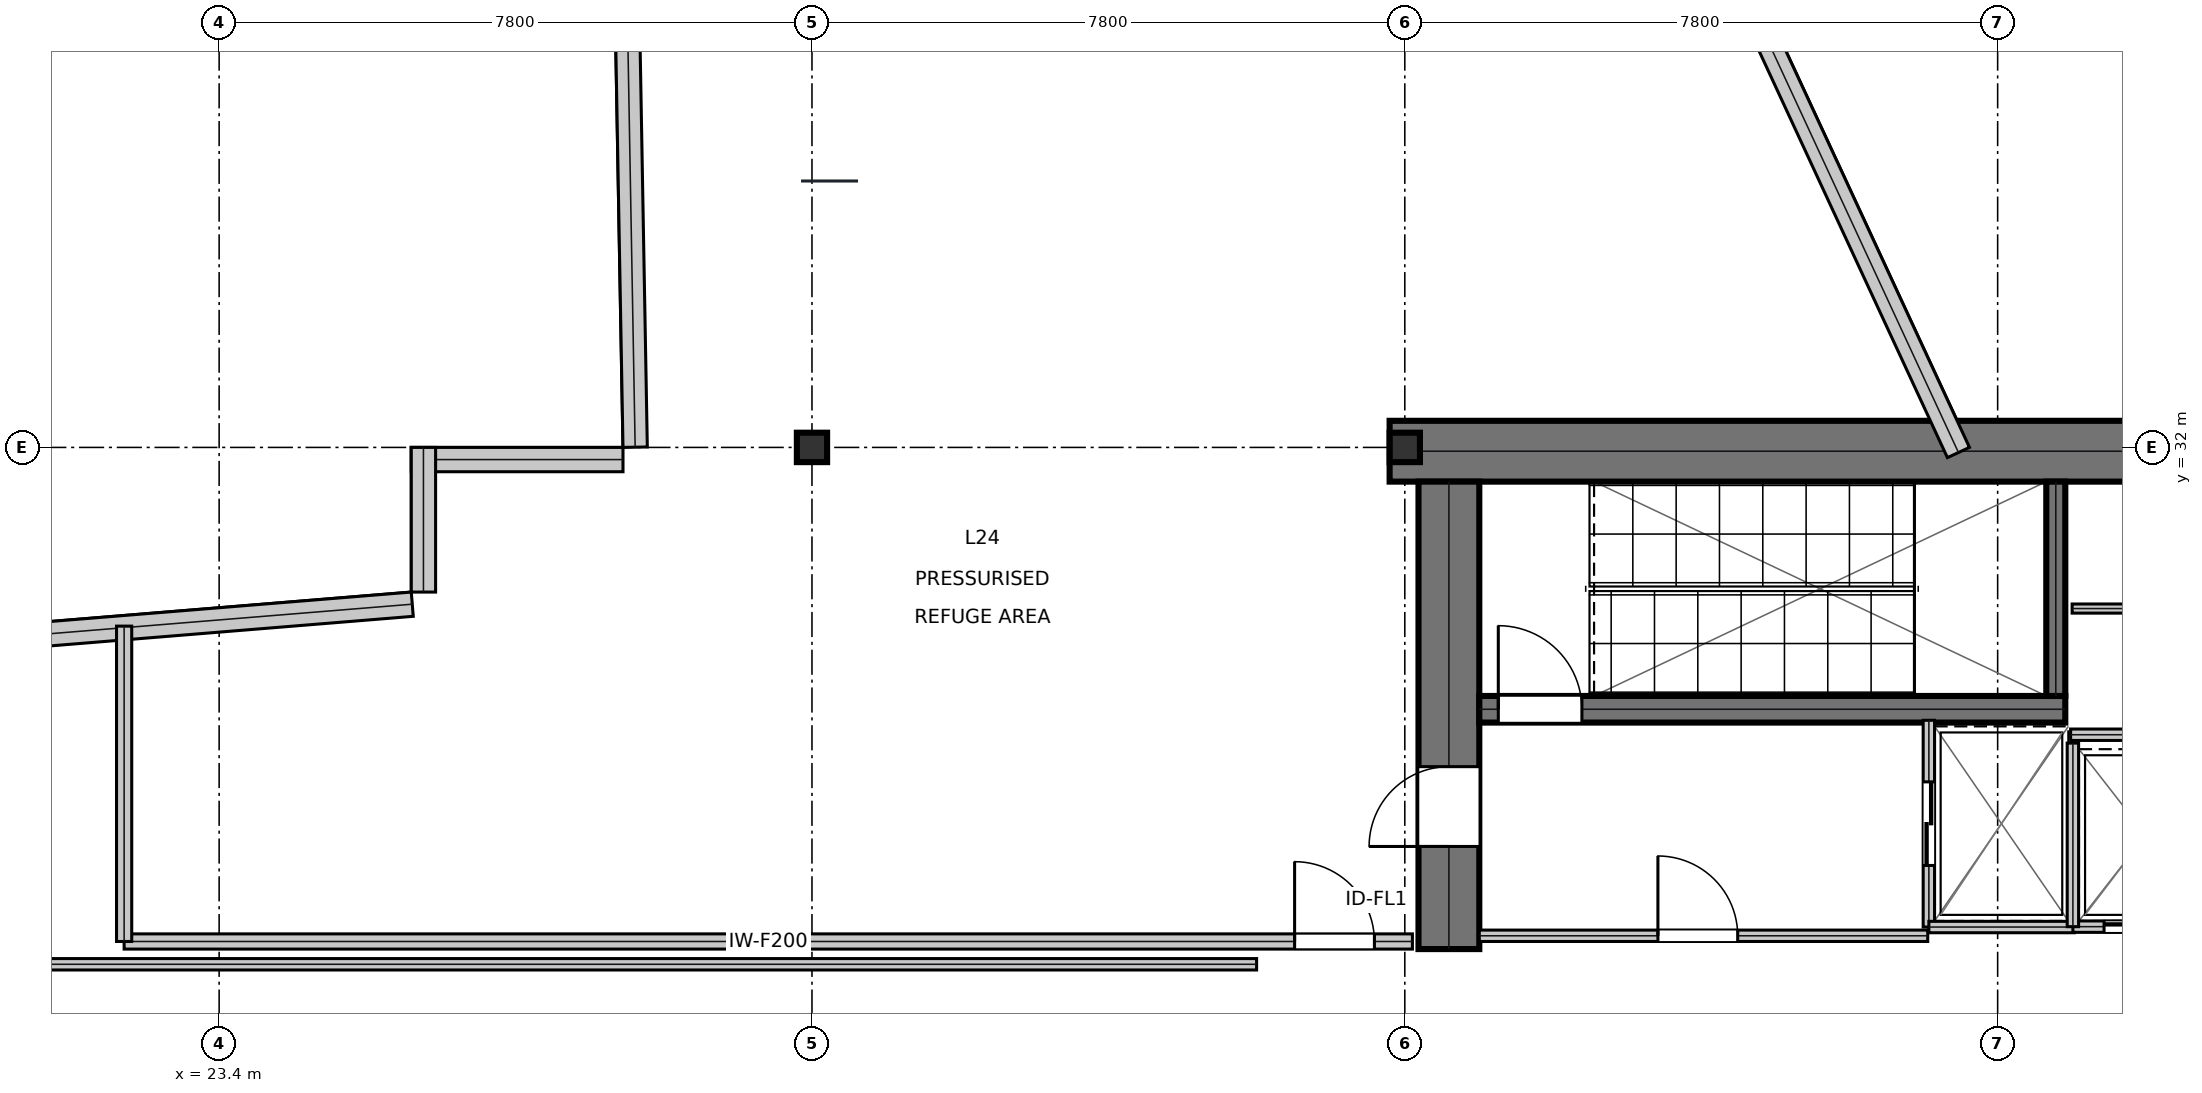
"""IFC4 building model, lengths in metres.
Left out: names, types, materials, properties, quantities, classifications, styles, units other than length and angle.
Written with IfcOpenShell. Run it as: python <this file> out.ifc"""

import sys

from ifc_helpers import new_model, si_unit, direction, frame, frame_2d, origin, origin_2d, place, context, subcontext, project, spatial, rectangle, i_section, extrude, element, fill, save


model = new_model("IFC4")
c1 = context("Model", 3, precision=1e-05, world=origin(), true_north=direction((0.0, 1.0)))
c2 = subcontext(c1, "Body", "Model", "MODEL_VIEW")
j1 = project(units=[si_unit("LENGTHUNIT", "METRE"), si_unit("PLANEANGLEUNIT", "RADIAN")], contexts=[c1])
p1 = place(None, origin())
s1 = spatial("IfcSite", under=j1, at=p1, CompositionType="ELEMENT")
p2 = place(p1, origin())
s2 = spatial("IfcBuilding", under=s1, at=p2, CompositionType="ELEMENT")
p3 = place(p2, frame((0.0, 0.0, 106.65)))
s3 = spatial("IfcBuildingStorey", under=s2, at=p3, CompositionType="ELEMENT", Elevation=106.65)
p4 = place(p3, frame((38.8, 31.95, 0.0), z_axis=(0.0, 0.0, 1.0), x_axis=(1.0, 0.0, 0.0)))
e1 = element("IfcWall", 1, at=p4, inside=s3, PredefinedType="SHEAR", context=c2, shape_type="SweptSolid", body=[
    extrude(rectangle(XDim=16.0, YDim=0.8, at=frame_2d((8.0, 0.0))), origin(), (0.0, 0.0, 1.0), 5.12),
])
p5 = place(p3, frame((39.58, 25.4, 0.0), z_axis=(0.0, 0.0, 1.0), x_axis=(0.0, 1.0, 0.0)))
e2 = element("IfcWall", 2, at=p5, inside=s3, PredefinedType="SHEAR", context=c2, shape_type="SweptSolid", body=[
    extrude(rectangle(XDim=6.15, YDim=0.8, at=frame_2d((3.075, 0.0))), origin(), (0.0, 0.0, 1.0), 5.12),
])
p6 = place(p5, frame((1.35, 0.0, 0.0)))
e3 = element("IfcOpeningElement", 3, at=p6, cuts=e2, PredefinedType="OPENING", context=c2, shape_type="SweptSolid", body=[
    extrude(rectangle(XDim=1.05, YDim=2.15, at=frame_2d((0.525, 1.075))), frame((0.0, 0.41, 0.0), z_axis=(0.0, -1.0, 0.0), x_axis=(1.0, 0.0, 0.0)), (0.0, 0.0, 1.0), 0.82),
])
p7 = place(p3, frame((39.98, 28.555, 0.0), z_axis=(0.0, 0.0, 1.0), x_axis=(1.0, 0.0, 0.0)))
e4 = element("IfcWall", 4, at=p7, inside=s3, PredefinedType="SHEAR", context=c2, shape_type="SweptSolid", body=[
    extrude(rectangle(XDim=7.71, YDim=0.35, at=frame_2d((3.855, 0.0))), origin(), (0.0, 0.0, 1.0), 5.12),
])
p8 = place(p7, frame((0.25, 0.0, 0.0)))
e5 = element("IfcOpeningElement", 5, at=p8, cuts=e4, PredefinedType="OPENING", context=c2, shape_type="SweptSolid", body=[
    extrude(rectangle(XDim=1.1, YDim=2.15, at=frame_2d((0.55, 1.075))), frame((0.0, 0.185, 0.0), z_axis=(0.0, -1.0, 0.0), x_axis=(1.0, 0.0, 0.0)), (0.0, 0.0, 1.0), 0.37),
])
p9 = place(p3, frame((47.565, 28.73, 0.0), z_axis=(0.0, 0.0, 1.0), x_axis=(0.0, 1.0, 0.0)))
e6 = element("IfcWall", 6, at=p9, inside=s3, PredefinedType="SHEAR", context=c2, shape_type="SweptSolid", body=[
    extrude(rectangle(XDim=2.82, YDim=0.25, at=frame_2d((1.41, 0.0))), origin(), (0.0, 0.0, 1.0), 5.12),
])
for number, where, z_axis, x_axis in (
    (7, (31.2, 32.0, 0.0), (0.0, 0.0, 1.0), (1.0, 0.0, 0.0)),
    (8, (39.0, 32.0, 0.0), (0.0, 0.0, 1.0), (1.0, 0.0, 0.0)),
):
    element("IfcColumn", number, at=place(p3, frame(where, z_axis=z_axis, x_axis=x_axis)), inside=s3, PredefinedType="COLUMN", context=c2, shape_type="SweptSolid", body=[
        extrude(i_section(OverallWidth=0.398, OverallDepth=0.387, WebThickness=0.021, FlangeThickness=0.033, at=origin_2d()), origin(), (0.0, 0.0, 1.0), 5.394),
    ])
p10 = place(p3, frame((46.284, 31.933, 0.0), z_axis=(0.0, 0.0, 1.0), x_axis=(-0.420271770487, 0.907398280212, 0.0)))
e9 = element("IfcWall", 9, at=p10, inside=s3, PredefinedType="STANDARD", context=c2, shape_type="SweptSolid", body=[
    extrude(rectangle(XDim=11.631, YDim=0.32, at=frame_2d((5.815, 0.0))), origin(), (0.0, 0.0, 1.0), 4.648),
])
p11 = place(p3, frame((28.681, 42.724, 0.0), z_axis=(0.0, 0.0, 1.0), x_axis=(0.017987206329, -0.999838217117, 0.0)))
e10 = element("IfcWall", 10, at=p11, inside=s3, PredefinedType="STANDARD", context=c2, shape_type="SweptSolid", body=[
    extrude(rectangle(XDim=10.723, YDim=0.32, at=frame_2d((5.361, 0.0))), origin(), (0.0, 0.0, 1.0), 5.12),
])
p12 = place(p3, frame((28.714, 31.84, 0.0), z_axis=(0.0, 0.0, 1.0), x_axis=(-1.0, 0.0, 0.0)))
e11 = element("IfcWall", 11, at=p12, inside=s3, PredefinedType="STANDARD", context=c2, shape_type="SweptSolid", body=[
    extrude(rectangle(XDim=2.786, YDim=0.32, at=frame_2d((1.393, 0.0))), origin(), (0.0, 0.0, 1.0), 5.12),
])
p13 = place(p3, frame((26.088, 32.0, 0.0), z_axis=(0.0, 0.0, 1.0), x_axis=(0.0, -1.0, 0.0)))
e12 = element("IfcWall", 12, at=p13, inside=s3, PredefinedType="STANDARD", context=c2, shape_type="SweptSolid", body=[
    extrude(rectangle(XDim=1.903, YDim=0.32, at=frame_2d((0.952, 0.0))), origin(), (0.0, 0.0, 1.0), 4.648),
])
p14 = place(p3, frame((25.941, 29.938, 0.0), z_axis=(0.0, 0.0, 1.0), x_axis=(-0.996692994059, -0.081259310815, 0.0)))
e13 = element("IfcWall", 13, at=p14, inside=s3, PredefinedType="STANDARD", context=c2, shape_type="SweptSolid", body=[
    extrude(rectangle(XDim=16.482, YDim=0.32, at=frame_2d((8.241, 0.0))), origin(), (0.0, 0.0, 1.0), 4.648),
])
p15 = place(p3, frame((39.98, 25.575, 0.0), z_axis=(0.0, 0.0, 1.0), x_axis=(1.0, 0.0, 0.0)))
e14 = element("IfcWall", 14, at=p15, inside=s3, PredefinedType="PARTITIONING", context=c2, shape_type="SweptSolid", body=[
    extrude(rectangle(XDim=5.9, YDim=0.15, at=frame_2d((2.95, 0.0))), origin(), (0.0, 0.0, 1.0), 5.12),
])
p16 = place(p15, frame((2.35, 0.0, 0.0)))
e15 = element("IfcOpeningElement", 15, at=p16, cuts=e14, PredefinedType="OPENING", context=c2, shape_type="SweptSolid", body=[
    extrude(rectangle(XDim=1.05, YDim=2.15, at=frame_2d((0.525, 1.075))), frame((0.0, 0.085, 0.0), z_axis=(0.0, -1.0, 0.0), x_axis=(1.0, 0.0, 0.0)), (0.0, 0.0, 1.0), 0.17),
])
p17 = place(p3, frame((45.895, 25.69, 0.0), z_axis=(0.0, 0.0, 1.0), x_axis=(0.0, 1.0, 0.0)))
e16 = element("IfcWall", 16, at=p17, inside=s3, PredefinedType="PARTITIONING", context=c2, shape_type="SweptSolid", body=[
    extrude(rectangle(XDim=2.72, YDim=0.15, at=frame_2d((1.36, 0.0))), origin(), (0.0, 0.0, 1.0), 5.12),
])
p18 = place(p17, frame((0.81, 0.0, 0.0)))
e17 = element("IfcOpeningElement", 17, at=p18, cuts=e16, PredefinedType="OPENING", context=c2, shape_type="SweptSolid", body=[
    extrude(rectangle(XDim=1.1, YDim=2.15, at=frame_2d((0.55, 1.075))), frame((0.0, 0.085, 0.0), z_axis=(0.0, -1.0, 0.0), x_axis=(1.0, 0.0, 0.0)), (0.0, 0.0, 1.0), 0.17),
])
p19 = place(p3, frame((45.895, 25.69, 0.0), z_axis=(0.0, 0.0, 1.0), x_axis=(1.0, 0.0, 0.0)))
e18 = element("IfcWall", 18, at=p19, inside=s3, PredefinedType="PARTITIONING", context=c2, shape_type="SweptSolid", body=[
    extrude(rectangle(XDim=1.915, YDim=0.15, at=frame_2d((0.958, 0.0))), origin(), (0.0, 0.0, 1.0), 5.12),
])
p20 = place(p3, frame((47.79, 25.695, 0.0), z_axis=(0.0, 0.0, 1.0), x_axis=(1.0, 0.0, 0.0)))
e19 = element("IfcWall", 19, at=p20, inside=s3, PredefinedType="PARTITIONING", context=c2, shape_type="SweptSolid", body=[
    extrude(rectangle(XDim=1.92, YDim=0.15, at=frame_2d((0.96, 0.0))), origin(), (0.0, 0.0, 1.0), 5.12),
])
p21 = place(p20, frame((0.41, 0.0, 0.0)))
e20 = element("IfcOpeningElement", 20, at=p21, cuts=e19, PredefinedType="OPENING", context=c2, shape_type="SweptSolid", body=[
    extrude(rectangle(XDim=1.1, YDim=2.15, at=frame_2d((0.55, 1.075))), frame((0.0, 0.085, 0.0), z_axis=(0.0, -1.0, 0.0), x_axis=(1.0, 0.0, 0.0)), (0.0, 0.0, 1.0), 0.17),
])
p22 = place(p3, frame((47.79, 25.695, 0.0), z_axis=(0.0, 0.0, 1.0), x_axis=(0.0, 1.0, 0.0)))
e21 = element("IfcWall", 21, at=p22, inside=s3, PredefinedType="PARTITIONING", context=c2, shape_type="SweptSolid", body=[
    extrude(rectangle(XDim=2.415, YDim=0.15, at=frame_2d((1.208, 0.0))), origin(), (0.0, 0.0, 1.0), 5.12),
])
p23 = place(p3, frame((47.76, 28.22, 0.0), z_axis=(0.0, 0.0, 1.0), x_axis=(1.0, 0.0, 0.0)))
e22 = element("IfcWall", 22, at=p23, inside=s3, PredefinedType="PARTITIONING", context=c2, shape_type="SweptSolid", body=[
    extrude(rectangle(XDim=1.96, YDim=0.15, at=frame_2d((0.98, 0.0))), origin(), (0.0, 0.0, 1.0), 5.12),
])
p24 = place(p3, frame((47.78, 29.88, 0.0), z_axis=(0.0, 0.0, 1.0), x_axis=(1.0, 0.0, 0.0)))
e23 = element("IfcWall", 23, at=p24, inside=s3, PredefinedType="PARTITIONING", context=c2, shape_type="SweptSolid", body=[
    extrude(rectangle(XDim=1.92, YDim=0.12, at=frame_2d((0.96, 0.0))), origin(), (0.0, 0.0, 1.0), 5.12),
])
p25 = place(p3, frame((22.15, 25.5, 0.0), z_axis=(0.0, 0.0, 1.0), x_axis=(1.0, 0.0, 0.0)))
e24 = element("IfcWall", 24, at=p25, inside=s3, PredefinedType="SOLIDWALL", context=c2, shape_type="SweptSolid", body=[
    extrude(rectangle(XDim=16.95, YDim=0.2, at=frame_2d((8.475, 0.0))), origin(), (0.0, 0.0, 1.0), 4.5),
])
p26 = place(p25, frame((15.4, 0.0, 0.0)))
e25 = element("IfcOpeningElement", 25, at=p26, cuts=e24, PredefinedType="OPENING", context=c2, shape_type="SweptSolid", body=[
    extrude(rectangle(XDim=1.05, YDim=2.15, at=frame_2d((0.525, 1.075))), frame((0.0, 0.11, 0.0), z_axis=(0.0, -1.0, 0.0), x_axis=(1.0, 0.0, 0.0)), (0.0, 0.0, 1.0), 0.22),
])
p27 = place(p3, frame((22.15, 25.5, 0.0), z_axis=(0.0, 0.0, 1.0), x_axis=(0.0, 1.0, 0.0)))
e26 = element("IfcWall", 26, at=p27, inside=s3, PredefinedType="SOLIDWALL", context=c2, shape_type="SweptSolid", body=[
    extrude(rectangle(XDim=4.149, YDim=0.2, at=frame_2d((2.074, 0.0))), origin(), (0.0, 0.0, 1.0), 5.12),
])
p28 = place(p3, frame((16.5, 25.2, 0.0), z_axis=(0.0, 0.0, 1.0), x_axis=(1.0, 0.0, 0.0)))
e27 = element("IfcWall", 27, at=p28, inside=s3, PredefinedType="PARTITIONING", context=c2, shape_type="SweptSolid", body=[
    extrude(rectangle(XDim=20.55, YDim=0.15, at=frame_2d((10.275, 0.0))), origin(), (0.0, 0.0, 1.0), 4.5),
])
p29 = place(p28, frame((3.095, 0.0, 0.0)))
e28 = element("IfcOpeningElement", 28, at=p29, cuts=e27, PredefinedType="OPENING", context=c2, shape_type="SweptSolid", body=[
    extrude(rectangle(XDim=1.4, YDim=2.2, at=frame_2d((0.7, 1.1))), frame((0.0, 0.085, 0.0), z_axis=(0.0, -1.0, 0.0), x_axis=(1.0, 0.0, 0.0)), (0.0, 0.0, 1.0), 0.17),
])
p30 = place(p16, origin())
e29 = element("IfcDoor", 29, at=p30, inside=s3, OperationType="SINGLE_SWING_LEFT", PredefinedType="DOOR", context=c2, shape_type="SweptSolid", body=[
    extrude(rectangle(XDim=1.05, YDim=2.15, at=frame_2d((0.525, 1.075))), frame((0.0, 0.025, 0.0), z_axis=(0.0, -1.0, 0.0), x_axis=(1.0, 0.0, 0.0)), (0.0, 0.0, 1.0), 0.05),
])
fill(e15, e29)
p31 = place(p18, frame((1.1, 0.0, 0.0), z_axis=(0.0, 0.0, 1.0), x_axis=(-1.0, 0.0, 0.0)))
e30 = element("IfcDoor", 30, at=p31, inside=s3, OperationType="DOUBLE_DOOR_SLIDING", PredefinedType="DOOR", context=c2, shape_type="SweptSolid", body=[
    extrude(rectangle(XDim=1.1, YDim=2.15, at=frame_2d((0.55, 1.075))), frame((0.0, 0.025, 0.0), z_axis=(0.0, -1.0, 0.0), x_axis=(1.0, 0.0, 0.0)), (0.0, 0.0, 1.0), 0.05),
])
fill(e17, e30)
p32 = place(p21, frame((1.1, 0.0, 0.0), z_axis=(0.0, 0.0, 1.0), x_axis=(-1.0, 0.0, 0.0)))
e31 = element("IfcDoor", 31, at=p32, inside=s3, OperationType="DOUBLE_DOOR_SLIDING", PredefinedType="DOOR", context=c2, shape_type="SweptSolid", body=[
    extrude(rectangle(XDim=1.1, YDim=2.15, at=frame_2d((0.55, 1.075))), frame((0.0, 0.025, 0.0), z_axis=(0.0, -1.0, 0.0), x_axis=(1.0, 0.0, 0.0)), (0.0, 0.0, 1.0), 0.05),
])
fill(e20, e31)
p33 = place(p26, origin())
e32 = element("IfcDoor", 32, at=p33, inside=s3, OperationType="SINGLE_SWING_LEFT", PredefinedType="DOOR", context=c2, shape_type="SweptSolid", body=[
    extrude(rectangle(XDim=1.05, YDim=2.15, at=frame_2d((0.525, 1.075))), frame((0.0, 0.025, 0.0), z_axis=(0.0, -1.0, 0.0), x_axis=(1.0, 0.0, 0.0)), (0.0, 0.0, 1.0), 0.05),
])
fill(e25, e32)
p34 = place(p8, origin())
e33 = element("IfcDoor", 33, at=p34, inside=s3, OperationType="SINGLE_SWING_LEFT", PredefinedType="DOOR", context=c2, shape_type="SweptSolid", body=[
    extrude(rectangle(XDim=1.1, YDim=2.15, at=frame_2d((0.55, 1.075))), frame((0.0, 0.025, 0.0), z_axis=(0.0, -1.0, 0.0), x_axis=(1.0, 0.0, 0.0)), (0.0, 0.0, 1.0), 0.05),
])
fill(e5, e33)
p35 = place(p6, origin())
e34 = element("IfcDoor", 34, at=p35, inside=s3, OperationType="SINGLE_SWING_LEFT", PredefinedType="DOOR", context=c2, shape_type="SweptSolid", body=[
    extrude(rectangle(XDim=1.05, YDim=2.15, at=frame_2d((0.525, 1.075))), frame((0.0, 0.025, 0.0), z_axis=(0.0, -1.0, 0.0), x_axis=(1.0, 0.0, 0.0)), (0.0, 0.0, 1.0), 0.05),
])
fill(e3, e34)
save(model, sys.argv[1])
